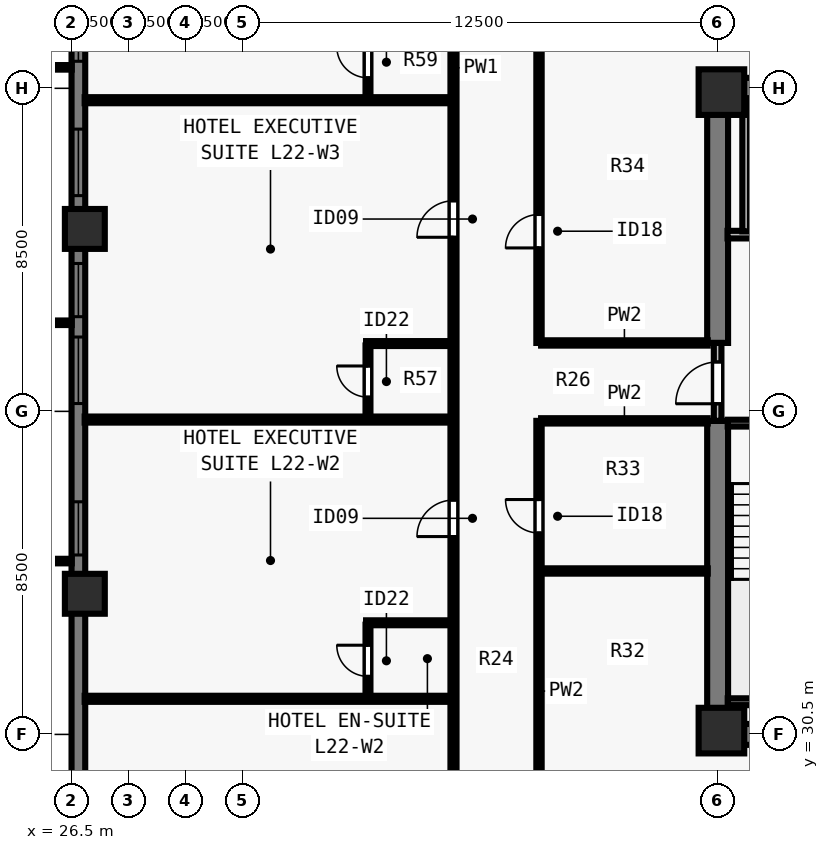
"""IFC4 building model, lengths in metres.
Left out: names, types, materials, properties, quantities, classifications, styles, units other than length and angle.
Written with IfcOpenShell. Run it as: python <this file> out.ifc"""

import sys

from ifc_helpers import new_model, si_unit, direction, frame, frame_2d, origin, origin_2d, place, context, subcontext, project, spatial, rectangle, extrude, element, fill, save


model = new_model("IFC4")
c1 = context("Model", 3, precision=1e-05, world=origin(), true_north=direction((0.0, 1.0)))
c2 = subcontext(c1, "Body", "Model", "MODEL_VIEW")
j1 = project(units=[si_unit("LENGTHUNIT", "METRE"), si_unit("PLANEANGLEUNIT", "RADIAN")], contexts=[c1])
p1 = place(None, origin())
s1 = spatial("IfcSite", under=j1, at=p1, CompositionType="ELEMENT")
p2 = place(p1, origin())
s2 = spatial("IfcBuilding", under=s1, at=p2, CompositionType="ELEMENT")
p3 = place(p2, frame((0.0, 0.0, 83.0)))
s3 = spatial("IfcBuildingStorey", under=s2, at=p3, CompositionType="ELEMENT", Elevation=83.0)
for number, where, z_axis, x_axis in (
    (1, (43.6, 30.6, 0.0), (0.0, 0.0, 1.0), (1.0, 0.0, 0.0)),
    (2, (43.6, 47.4, 0.0), (0.0, 0.0, 1.0), (1.0, 0.0, 0.0)),
):
    element("IfcColumn", number, at=place(p3, frame(where, z_axis=z_axis, x_axis=x_axis)), inside=s3, PredefinedType="COLUMN", context=c2, shape_type="SweptSolid", body=[
        extrude(rectangle(XDim=1.2, YDim=1.2, at=origin_2d()), origin(), (0.0, 0.0, 1.0), 3.5),
    ])
for number, where, z_axis, x_axis in (
    (3, (26.85, 43.8, 0.0), (0.0, 0.0, 1.0), (0.0, 1.0, 0.0)),
    (4, (26.85, 34.2, 0.0), (0.0, 0.0, 1.0), (0.0, 1.0, 0.0)),
):
    element("IfcColumn", number, at=place(p3, frame(where, z_axis=z_axis, x_axis=x_axis)), inside=s3, PredefinedType="COLUMN", context=c2, shape_type="SweptSolid", body=[
        extrude(rectangle(XDim=1.05, YDim=1.05, at=origin_2d()), origin(), (0.0, 0.0, 1.0), 3.5),
    ])
p4 = place(p3, frame((26.68, 16.5, 0.0), z_axis=(0.0, 0.0, 1.0), x_axis=(0.0, 1.0, 0.0)))
e5 = element("IfcWall", 5, at=p4, inside=s3, PredefinedType="SOLIDWALL", context=c2, shape_type="SweptSolid", body=[
    extrude(rectangle(XDim=44.662, YDim=0.36, at=frame_2d((22.331, 0.0))), origin(), (0.0, 0.0, 1.0), 3.28),
])
p5 = place(p4, frame((4.83, 0.0, 0.8)))
e6 = element("IfcOpeningElement", 6, at=p5, cuts=e5, PredefinedType="OPENING", context=c2, shape_type="SweptSolid", body=[
    extrude(rectangle(XDim=1.4, YDim=1.544, at=frame_2d((0.7, 0.772))), frame((0.0, 0.19, 0.0), z_axis=(0.0, -1.0, 0.0), x_axis=(1.0, 0.0, 0.0)), (0.0, 0.0, 1.0), 0.38),
])
p6 = place(p4, frame((8.015, 0.0, 0.8)))
e7 = element("IfcOpeningElement", 7, at=p6, cuts=e5, PredefinedType="OPENING", context=c2, shape_type="SweptSolid", body=[
    extrude(rectangle(XDim=1.75, YDim=1.544, at=frame_2d((0.875, 0.772))), frame((0.0, 0.19, 0.0), z_axis=(0.0, -1.0, 0.0), x_axis=(1.0, 0.0, 0.0)), (0.0, 0.0, 1.0), 0.38),
])
p7 = place(p4, frame((11.551, 0.0, 0.8)))
e8 = element("IfcOpeningElement", 8, at=p7, cuts=e5, PredefinedType="OPENING", context=c2, shape_type="SweptSolid", body=[
    extrude(rectangle(XDim=1.4, YDim=1.544, at=frame_2d((0.7, 0.772))), frame((0.0, 0.19, 0.0), z_axis=(0.0, -1.0, 0.0), x_axis=(1.0, 0.0, 0.0)), (0.0, 0.0, 1.0), 0.38),
])
p8 = place(p4, frame((18.721, 0.0, 0.8)))
e9 = element("IfcOpeningElement", 9, at=p8, cuts=e5, PredefinedType="OPENING", context=c2, shape_type="SweptSolid", body=[
    extrude(rectangle(XDim=1.4, YDim=1.544, at=frame_2d((0.7, 0.772))), frame((0.0, 0.19, 0.0), z_axis=(0.0, -1.0, 0.0), x_axis=(1.0, 0.0, 0.0)), (0.0, 0.0, 1.0), 0.38),
])
p9 = place(p4, frame((22.706, 0.0, 0.8)))
e10 = element("IfcOpeningElement", 10, at=p9, cuts=e5, PredefinedType="OPENING", context=c2, shape_type="SweptSolid", body=[
    extrude(rectangle(XDim=1.75, YDim=1.544, at=frame_2d((0.875, 0.772))), frame((0.0, 0.19, 0.0), z_axis=(0.0, -1.0, 0.0), x_axis=(1.0, 0.0, 0.0)), (0.0, 0.0, 1.0), 0.38),
])
p10 = place(p4, frame((24.991, 0.0, 0.8)))
e11 = element("IfcOpeningElement", 11, at=p10, cuts=e5, PredefinedType="OPENING", context=c2, shape_type="SweptSolid", body=[
    extrude(rectangle(XDim=1.4, YDim=1.544, at=frame_2d((0.7, 0.772))), frame((0.0, 0.19, 0.0), z_axis=(0.0, -1.0, 0.0), x_axis=(1.0, 0.0, 0.0)), (0.0, 0.0, 1.0), 0.38),
])
p11 = place(p4, frame((28.177, 0.0, 0.8)))
e12 = element("IfcOpeningElement", 12, at=p11, cuts=e5, PredefinedType="OPENING", context=c2, shape_type="SweptSolid", body=[
    extrude(rectangle(XDim=1.75, YDim=1.544, at=frame_2d((0.875, 0.772))), frame((0.0, 0.19, 0.0), z_axis=(0.0, -1.0, 0.0), x_axis=(1.0, 0.0, 0.0)), (0.0, 0.0, 1.0), 0.38),
])
p12 = place(p4, frame((31.711, 0.0, 0.8)))
e13 = element("IfcOpeningElement", 13, at=p12, cuts=e5, PredefinedType="OPENING", context=c2, shape_type="SweptSolid", body=[
    extrude(rectangle(XDim=1.4, YDim=1.544, at=frame_2d((0.7, 0.772))), frame((0.0, 0.19, 0.0), z_axis=(0.0, -1.0, 0.0), x_axis=(1.0, 0.0, 0.0)), (0.0, 0.0, 1.0), 0.38),
])
p13 = place(p4, frame((34.897, 0.0, 0.8)))
e14 = element("IfcOpeningElement", 14, at=p13, cuts=e5, PredefinedType="OPENING", context=c2, shape_type="SweptSolid", body=[
    extrude(rectangle(XDim=1.75, YDim=1.544, at=frame_2d((0.875, 0.772))), frame((0.0, 0.19, 0.0), z_axis=(0.0, -1.0, 0.0), x_axis=(1.0, 0.0, 0.0)), (0.0, 0.0, 1.0), 0.38),
])
for number, where, z_axis, x_axis in (
    (15, (43.225, 30.5, 0.0), (0.0, 0.0, 1.0), (1.0, 0.0, 0.0)),
    (16, (43.225, 47.5, 0.0), (0.0, 0.0, 1.0), (1.0, 0.0, 0.0)),
):
    element("IfcWall", number, at=place(p3, frame(where, z_axis=z_axis, x_axis=x_axis)), inside=s3, PredefinedType="SHEAR", context=c2, shape_type="SweptSolid", body=[
        extrude(rectangle(XDim=17.55, YDim=0.55, at=frame_2d((8.775, 0.0))), origin(), (0.0, 0.0, 1.0), 3.28),
    ])
p14 = place(p3, frame((43.5, 30.765, 0.0), z_axis=(0.0, 0.0, 1.0), x_axis=(0.0, 1.0, 0.0)))
e17 = element("IfcWall", 17, at=p14, inside=s3, PredefinedType="SHEAR", context=c2, shape_type="SweptSolid", body=[
    extrude(rectangle(XDim=7.985, YDim=0.55, at=frame_2d((3.993, 0.0))), origin(), (0.0, 0.0, 1.0), 3.28),
])
p15 = place(p3, frame((43.5, 40.8, 0.0), z_axis=(0.0, 0.0, 1.0), x_axis=(0.0, 1.0, 0.0)))
e18 = element("IfcWall", 18, at=p15, inside=s3, PredefinedType="SHEAR", context=c2, shape_type="SweptSolid", body=[
    extrude(rectangle(XDim=6.435, YDim=0.55, at=frame_2d((3.218, 0.0))), origin(), (0.0, 0.0, 1.0), 3.28),
])
p16 = place(p3, frame((43.5, 38.75, 0.0), z_axis=(0.0, 0.0, 1.0), x_axis=(0.0, 1.0, 0.0)))
e19 = element("IfcWall", 19, at=p16, inside=s3, PredefinedType="SOLIDWALL", context=c2, shape_type="SweptSolid", body=[
    extrude(rectangle(XDim=2.05, YDim=0.2, at=frame_2d((1.025, 0.0))), origin(), (0.0, 0.0, 1.0), 3.28),
])
p17 = place(p16, frame((0.45, 0.0, 0.0)))
e20 = element("IfcOpeningElement", 20, at=p17, cuts=e19, PredefinedType="OPENING", context=c2, shape_type="SweptSolid", body=[
    extrude(rectangle(XDim=1.1, YDim=2.15, at=frame_2d((0.55, 1.075))), frame((0.0, 0.11, 0.0), z_axis=(0.0, -1.0, 0.0), x_axis=(1.0, 0.0, 0.0)), (0.0, 0.0, 1.0), 0.22),
])
p18 = place(p3, frame((43.76, 43.65, 0.0), z_axis=(0.0, 0.0, 1.0), x_axis=(1.0, 0.0, 0.0)))
e21 = element("IfcWall", 21, at=p18, inside=s3, PredefinedType="SOLIDWALL", context=c2, shape_type="SweptSolid", body=[
    extrude(rectangle(XDim=3.505, YDim=0.2, at=frame_2d((1.752, 0.0))), origin(), (0.0, 0.0, 1.0), 3.28),
])
p19 = place(p18, frame((1.11, 0.0, 0.0)))
e22 = element("IfcOpeningElement", 22, at=p19, cuts=e21, PredefinedType="OPENING", context=c2, shape_type="SweptSolid", body=[
    extrude(rectangle(XDim=1.1, YDim=2.2, at=frame_2d((0.55, 1.1))), frame((0.0, 0.11, 0.0), z_axis=(0.0, -1.0, 0.0), x_axis=(1.0, 0.0, 0.0)), (0.0, 0.0, 1.0), 0.22),
])
p20 = place(p3, frame((44.25, 43.735, 0.0), z_axis=(0.0, 0.0, 1.0), x_axis=(0.0, 1.0, 0.0)))
e23 = element("IfcWall", 23, at=p20, inside=s3, PredefinedType="SOLIDWALL", context=c2, shape_type="SweptSolid", body=[
    extrude(rectangle(XDim=3.505, YDim=0.2, at=frame_2d((1.752, 0.0))), origin(), (0.0, 0.0, 1.0), 3.28),
])
p21 = place(p3, frame((36.55, 23.315, 0.0), z_axis=(0.0, 0.0, 1.0), x_axis=(0.0, 1.0, 0.0)))
e24 = element("IfcWall", 24, at=p21, inside=s3, PredefinedType="PARTITIONING", context=c2, shape_type="SweptSolid", body=[
    extrude(rectangle(XDim=31.37, YDim=0.16, at=frame_2d((15.685, 0.0))), origin(), (0.0, 0.0, 1.0), 3.28),
])
p22 = place(p21, frame((4.848, 0.0, 0.0)))
e25 = element("IfcOpeningElement", 25, at=p22, cuts=e24, PredefinedType="OPENING", context=c2, shape_type="SweptSolid", body=[
    extrude(rectangle(XDim=0.96, YDim=2.15, at=frame_2d((0.48, 1.075))), frame((0.0, 0.09, 0.0), z_axis=(0.0, -1.0, 0.0), x_axis=(1.0, 0.0, 0.0)), (0.0, 0.0, 1.0), 0.18),
])
p23 = place(p21, frame((12.39, 0.0, 0.0)))
e26 = element("IfcOpeningElement", 26, at=p23, cuts=e24, PredefinedType="OPENING", context=c2, shape_type="SweptSolid", body=[
    extrude(rectangle(XDim=0.96, YDim=2.15, at=frame_2d((0.48, 1.075))), frame((0.0, 0.09, 0.0), z_axis=(0.0, -1.0, 0.0), x_axis=(1.0, 0.0, 0.0)), (0.0, 0.0, 1.0), 0.18),
])
p24 = place(p21, frame((20.265, 0.0, 0.0)))
e27 = element("IfcOpeningElement", 27, at=p24, cuts=e24, PredefinedType="OPENING", context=c2, shape_type="SweptSolid", body=[
    extrude(rectangle(XDim=0.96, YDim=2.15, at=frame_2d((0.48, 1.075))), frame((0.0, 0.09, 0.0), z_axis=(0.0, -1.0, 0.0), x_axis=(1.0, 0.0, 0.0)), (0.0, 0.0, 1.0), 0.18),
])
p25 = place(p21, frame((28.223, 0.0, 0.0)))
e28 = element("IfcOpeningElement", 28, at=p25, cuts=e24, PredefinedType="OPENING", context=c2, shape_type="SweptSolid", body=[
    extrude(rectangle(XDim=0.96, YDim=2.15, at=frame_2d((0.48, 1.075))), frame((0.0, 0.09, 0.0), z_axis=(0.0, -1.0, 0.0), x_axis=(1.0, 0.0, 0.0)), (0.0, 0.0, 1.0), 0.18),
])
p26 = place(p3, frame((38.8, 25.555, 0.0), z_axis=(0.0, 0.0, 1.0), x_axis=(0.0, 1.0, 0.0)))
e29 = element("IfcWall", 29, at=p26, inside=s3, PredefinedType="PARTITIONING", context=c2, shape_type="SweptSolid", body=[
    extrude(rectangle(XDim=13.195, YDim=0.14, at=frame_2d((6.598, 0.0))), origin(), (0.0, 0.0, 1.0), 3.28),
])
p27 = place(p26, frame((1.045, 0.0, 0.0)))
e30 = element("IfcOpeningElement", 30, at=p27, cuts=e29, PredefinedType="OPENING", context=c2, shape_type="SweptSolid", body=[
    extrude(rectangle(XDim=0.88, YDim=2.1, at=frame_2d((0.44, 1.05))), frame((0.0, 0.08, 0.0), z_axis=(0.0, -1.0, 0.0), x_axis=(1.0, 0.0, 0.0)), (0.0, 0.0, 1.0), 0.16),
])
p28 = place(p26, frame((10.245, 0.0, 0.0)))
e31 = element("IfcOpeningElement", 31, at=p28, cuts=e29, PredefinedType="OPENING", context=c2, shape_type="SweptSolid", body=[
    extrude(rectangle(XDim=0.88, YDim=2.1, at=frame_2d((0.44, 1.05))), frame((0.0, 0.08, 0.0), z_axis=(0.0, -1.0, 0.0), x_axis=(1.0, 0.0, 0.0)), (0.0, 0.0, 1.0), 0.16),
])
p29 = place(p3, frame((38.8, 40.8, 0.0), z_axis=(0.0, 0.0, 1.0), x_axis=(0.0, 1.0, 0.0)))
e32 = element("IfcWall", 32, at=p29, inside=s3, PredefinedType="PARTITIONING", context=c2, shape_type="SweptSolid", body=[
    extrude(rectangle(XDim=11.645, YDim=0.14, at=frame_2d((5.823, 0.0))), origin(), (0.0, 0.0, 1.0), 3.28),
])
p30 = place(p29, frame((2.5, 0.0, 0.0)))
e33 = element("IfcOpeningElement", 33, at=p30, cuts=e32, PredefinedType="OPENING", context=c2, shape_type="SweptSolid", body=[
    extrude(rectangle(XDim=0.88, YDim=2.1, at=frame_2d((0.44, 1.05))), frame((0.0, 0.08, 0.0), z_axis=(0.0, -1.0, 0.0), x_axis=(1.0, 0.0, 0.0)), (0.0, 0.0, 1.0), 0.16),
])
for number, where, z_axis, x_axis in (
    (34, (38.855, 38.75, 0.0), (0.0, 0.0, 1.0), (1.0, 0.0, 0.0)),
    (35, (38.855, 40.8, 0.0), (0.0, 0.0, 1.0), (1.0, 0.0, 0.0)),
    (36, (38.855, 34.8, 0.0), (0.0, 0.0, 1.0), (1.0, 0.0, 0.0)),
):
    element("IfcWall", number, at=place(p3, frame(where, z_axis=z_axis, x_axis=x_axis)), inside=s3, PredefinedType="PARTITIONING", context=c2, shape_type="SweptSolid", body=[
        extrude(rectangle(XDim=4.385, YDim=0.14, at=frame_2d((2.192, 0.0))), origin(), (0.0, 0.0, 1.0), 3.28),
    ])
p31 = place(p3, frame((26.845, 31.437, 0.0), z_axis=(0.0, 0.0, 1.0), x_axis=(1.0, 0.0, 0.0)))
e37 = element("IfcWall", 37, at=p31, inside=s3, PredefinedType="PARTITIONING", context=c2, shape_type="SweptSolid", body=[
    extrude(rectangle(XDim=9.64, YDim=0.16, at=frame_2d((4.82, 0.0))), origin(), (0.0, 0.0, 1.0), 3.28),
])
p32 = place(p3, frame((34.25, 33.437, 0.0), z_axis=(0.0, 0.0, 1.0), x_axis=(1.0, 0.0, 0.0)))
e38 = element("IfcWall", 38, at=p32, inside=s3, PredefinedType="PLUMBINGWALL", context=c2, shape_type="SweptSolid", body=[
    extrude(rectangle(XDim=2.235, YDim=0.13, at=frame_2d((1.118, 0.0))), origin(), (0.0, 0.0, 1.0), 3.28),
])
p33 = place(p3, frame((34.3, 31.502, 0.0), z_axis=(0.0, 0.0, 1.0), x_axis=(0.0, 1.0, 0.0)))
e39 = element("IfcWall", 39, at=p33, inside=s3, PredefinedType="PLUMBINGWALL", context=c2, shape_type="SweptSolid", body=[
    extrude(rectangle(XDim=1.885, YDim=0.13, at=frame_2d((0.942, 0.0))), origin(), (0.0, 0.0, 1.0), 3.28),
])
p34 = place(p33, frame((0.525, 0.0, 0.0)))
e40 = element("IfcOpeningElement", 40, at=p34, cuts=e39, PredefinedType="OPENING", context=c2, shape_type="SweptSolid", body=[
    extrude(rectangle(XDim=0.82, YDim=2.1, at=frame_2d((0.41, 1.05))), frame((0.0, 0.075, 0.0), z_axis=(0.0, -1.0, 0.0), x_axis=(1.0, 0.0, 0.0)), (0.0, 0.0, 1.0), 0.15),
])
p35 = place(p3, frame((26.845, 38.784, 0.0), z_axis=(0.0, 0.0, 1.0), x_axis=(1.0, 0.0, 0.0)))
e41 = element("IfcWall", 41, at=p35, inside=s3, PredefinedType="PARTITIONING", context=c2, shape_type="SweptSolid", body=[
    extrude(rectangle(XDim=9.64, YDim=0.16, at=frame_2d((4.82, 0.0))), origin(), (0.0, 0.0, 1.0), 2.849),
])
p36 = place(p3, frame((34.25, 40.784, 0.0), z_axis=(0.0, 0.0, 1.0), x_axis=(1.0, 0.0, 0.0)))
e42 = element("IfcWall", 42, at=p36, inside=s3, PredefinedType="PLUMBINGWALL", context=c2, shape_type="SweptSolid", body=[
    extrude(rectangle(XDim=2.235, YDim=0.13, at=frame_2d((1.118, 0.0))), origin(), (0.0, 0.0, 1.0), 2.849),
])
p37 = place(p3, frame((34.3, 38.849, 0.0), z_axis=(0.0, 0.0, 1.0), x_axis=(0.0, 1.0, 0.0)))
e43 = element("IfcWall", 43, at=p37, inside=s3, PredefinedType="PLUMBINGWALL", context=c2, shape_type="SweptSolid", body=[
    extrude(rectangle(XDim=1.885, YDim=0.13, at=frame_2d((0.942, 0.0))), origin(), (0.0, 0.0, 1.0), 3.28),
])
p38 = place(p37, frame((0.525, 0.0, 0.0)))
e44 = element("IfcOpeningElement", 44, at=p38, cuts=e43, PredefinedType="OPENING", context=c2, shape_type="SweptSolid", body=[
    extrude(rectangle(XDim=0.82, YDim=2.1, at=frame_2d((0.41, 1.05))), frame((0.0, 0.075, 0.0), z_axis=(0.0, -1.0, 0.0), x_axis=(1.0, 0.0, 0.0)), (0.0, 0.0, 1.0), 0.15),
])
p39 = place(p3, frame((26.845, 47.187, 0.0), z_axis=(0.0, 0.0, 1.0), x_axis=(1.0, 0.0, 0.0)))
e45 = element("IfcWall", 45, at=p39, inside=s3, PredefinedType="PARTITIONING", context=c2, shape_type="SweptSolid", body=[
    extrude(rectangle(XDim=9.64, YDim=0.16, at=frame_2d((4.82, 0.0))), origin(), (0.0, 0.0, 1.0), 3.28),
])
p40 = place(p3, frame((34.3, 47.252, 0.0), z_axis=(0.0, 0.0, 1.0), x_axis=(0.0, 1.0, 0.0)))
e46 = element("IfcWall", 46, at=p40, inside=s3, PredefinedType="PLUMBINGWALL", context=c2, shape_type="SweptSolid", body=[
    extrude(rectangle(XDim=1.885, YDim=0.13, at=frame_2d((0.942, 0.0))), origin(), (0.0, 0.0, 1.0), 3.28),
])
p41 = place(p40, frame((0.525, 0.0, 0.0)))
e47 = element("IfcOpeningElement", 47, at=p41, cuts=e46, PredefinedType="OPENING", context=c2, shape_type="SweptSolid", body=[
    extrude(rectangle(XDim=0.82, YDim=2.1, at=frame_2d((0.41, 1.05))), frame((0.0, 0.075, 0.0), z_axis=(0.0, -1.0, 0.0), x_axis=(1.0, 0.0, 0.0)), (0.0, 0.0, 1.0), 0.15),
])
p42 = place(p3, frame((43.765, 38.69, 0.0), z_axis=(0.0, 0.0, 1.0), x_axis=(1.0, 0.0, 0.0)))
e48 = element("IfcWall", 48, at=p42, inside=s3, PredefinedType="SOLIDWALL", context=c2, shape_type="SweptSolid", body=[
    extrude(rectangle(XDim=3.23, YDim=0.18, at=frame_2d((1.615, 0.0))), origin(), (0.0, 0.0, 1.0), 3.28),
])
p43 = place(p42, frame((1.14, 0.0, 0.0)))
e49 = element("IfcOpeningElement", 49, at=p43, cuts=e48, PredefinedType="OPENING", context=c2, shape_type="SweptSolid", body=[
    extrude(rectangle(XDim=0.95, YDim=2.15, at=frame_2d((0.475, 1.075))), frame((0.0, 0.1, 0.0), z_axis=(0.0, -1.0, 0.0), x_axis=(1.0, 0.0, 0.0)), (0.0, 0.0, 1.0), 0.2),
])
p44 = place(p3, frame((43.765, 31.36, 0.0), z_axis=(0.0, 0.0, 1.0), x_axis=(1.0, 0.0, 0.0)))
e50 = element("IfcWall", 50, at=p44, inside=s3, PredefinedType="SOLIDWALL", context=c2, shape_type="SweptSolid", body=[
    extrude(rectangle(XDim=3.23, YDim=0.18, at=frame_2d((1.615, 0.0))), origin(), (0.0, 0.0, 1.0), 3.28),
])
p45 = place(p8, origin())
e51 = element("IfcWindow", 51, at=p45, inside=s3, PartitioningType="SINGLE_PANEL", PredefinedType="WINDOW", context=c2, shape_type="SweptSolid", body=[
    extrude(rectangle(XDim=1.4, YDim=1.544, at=frame_2d((0.7, 0.772))), frame((0.0, -0.05, 0.0), z_axis=(0.0, -1.0, 0.0), x_axis=(1.0, 0.0, 0.0)), (0.0, 0.0, 1.0), 0.06),
])
fill(e9, e51)
p46 = place(p9, origin())
e52 = element("IfcWindow", 52, at=p46, inside=s3, PartitioningType="SINGLE_PANEL", PredefinedType="WINDOW", context=c2, shape_type="SweptSolid", body=[
    extrude(rectangle(XDim=1.75, YDim=1.544, at=frame_2d((0.875, 0.772))), frame((0.0, -0.05, 0.0), z_axis=(0.0, -1.0, 0.0), x_axis=(1.0, 0.0, 0.0)), (0.0, 0.0, 1.0), 0.06),
])
fill(e10, e52)
p47 = place(p10, origin())
e53 = element("IfcWindow", 53, at=p47, inside=s3, PartitioningType="SINGLE_PANEL", PredefinedType="WINDOW", context=c2, shape_type="SweptSolid", body=[
    extrude(rectangle(XDim=1.4, YDim=1.544, at=frame_2d((0.7, 0.772))), frame((0.0, -0.05, 0.0), z_axis=(0.0, -1.0, 0.0), x_axis=(1.0, 0.0, 0.0)), (0.0, 0.0, 1.0), 0.06),
])
fill(e11, e53)
p48 = place(p11, origin())
e54 = element("IfcWindow", 54, at=p48, inside=s3, PartitioningType="SINGLE_PANEL", PredefinedType="WINDOW", context=c2, shape_type="SweptSolid", body=[
    extrude(rectangle(XDim=1.75, YDim=1.544, at=frame_2d((0.875, 0.772))), frame((0.0, -0.05, 0.0), z_axis=(0.0, -1.0, 0.0), x_axis=(1.0, 0.0, 0.0)), (0.0, 0.0, 1.0), 0.06),
])
fill(e12, e54)
p49 = place(p12, origin())
e55 = element("IfcWindow", 55, at=p49, inside=s3, PartitioningType="SINGLE_PANEL", PredefinedType="WINDOW", context=c2, shape_type="SweptSolid", body=[
    extrude(rectangle(XDim=1.4, YDim=1.544, at=frame_2d((0.7, 0.772))), frame((0.0, -0.05, 0.0), z_axis=(0.0, -1.0, 0.0), x_axis=(1.0, 0.0, 0.0)), (0.0, 0.0, 1.0), 0.06),
])
fill(e13, e55)
p50 = place(p17, origin())
e56 = element("IfcDoor", 56, at=p50, inside=s3, OperationType="SINGLE_SWING_LEFT", PredefinedType="DOOR", context=c2, shape_type="SweptSolid", body=[
    extrude(rectangle(XDim=1.1, YDim=2.15, at=frame_2d((0.55, 1.075))), frame((0.0, 0.025, 0.0), z_axis=(0.0, -1.0, 0.0), x_axis=(1.0, 0.0, 0.0)), (0.0, 0.0, 1.0), 0.05),
])
fill(e20, e56)
p51 = place(p28, origin())
e57 = element("IfcDoor", 57, at=p51, inside=s3, OperationType="SINGLE_SWING_RIGHT", PredefinedType="DOOR", context=c2, shape_type="SweptSolid", body=[
    extrude(rectangle(XDim=0.88, YDim=2.1, at=frame_2d((0.44, 1.05))), frame((0.0, 0.025, 0.0), z_axis=(0.0, -1.0, 0.0), x_axis=(1.0, 0.0, 0.0)), (0.0, 0.0, 1.0), 0.05),
])
fill(e31, e57)
p52 = place(p30, origin())
e58 = element("IfcDoor", 58, at=p52, inside=s3, OperationType="SINGLE_SWING_LEFT", PredefinedType="DOOR", context=c2, shape_type="SweptSolid", body=[
    extrude(rectangle(XDim=0.88, YDim=2.1, at=frame_2d((0.44, 1.05))), frame((0.0, 0.025, 0.0), z_axis=(0.0, -1.0, 0.0), x_axis=(1.0, 0.0, 0.0)), (0.0, 0.0, 1.0), 0.05),
])
fill(e33, e58)
p53 = place(p34, origin())
e59 = element("IfcDoor", 59, at=p53, inside=s3, OperationType="SINGLE_SWING_RIGHT", PredefinedType="DOOR", context=c2, shape_type="SweptSolid", body=[
    extrude(rectangle(XDim=0.82, YDim=2.1, at=frame_2d((0.41, 1.05))), frame((0.0, 0.025, 0.0), z_axis=(0.0, -1.0, 0.0), x_axis=(1.0, 0.0, 0.0)), (0.0, 0.0, 1.0), 0.05),
])
fill(e40, e59)
p54 = place(p23, origin())
e60 = element("IfcDoor", 60, at=p54, inside=s3, OperationType="SINGLE_SWING_LEFT", PredefinedType="DOOR", context=c2, shape_type="SweptSolid", body=[
    extrude(rectangle(XDim=0.96, YDim=2.15, at=frame_2d((0.48, 1.075))), frame((0.0, 0.025, 0.0), z_axis=(0.0, -1.0, 0.0), x_axis=(1.0, 0.0, 0.0)), (0.0, 0.0, 1.0), 0.05),
])
fill(e26, e60)
p55 = place(p38, origin())
e61 = element("IfcDoor", 61, at=p55, inside=s3, OperationType="SINGLE_SWING_RIGHT", PredefinedType="DOOR", context=c2, shape_type="SweptSolid", body=[
    extrude(rectangle(XDim=0.82, YDim=2.1, at=frame_2d((0.41, 1.05))), frame((0.0, 0.025, 0.0), z_axis=(0.0, -1.0, 0.0), x_axis=(1.0, 0.0, 0.0)), (0.0, 0.0, 1.0), 0.05),
])
fill(e44, e61)
p56 = place(p24, origin())
e62 = element("IfcDoor", 62, at=p56, inside=s3, OperationType="SINGLE_SWING_LEFT", PredefinedType="DOOR", context=c2, shape_type="SweptSolid", body=[
    extrude(rectangle(XDim=0.96, YDim=2.15, at=frame_2d((0.48, 1.075))), frame((0.0, 0.025, 0.0), z_axis=(0.0, -1.0, 0.0), x_axis=(1.0, 0.0, 0.0)), (0.0, 0.0, 1.0), 0.05),
])
fill(e27, e62)
p57 = place(p41, origin())
e63 = element("IfcDoor", 63, at=p57, inside=s3, OperationType="SINGLE_SWING_RIGHT", PredefinedType="DOOR", context=c2, shape_type="SweptSolid", body=[
    extrude(rectangle(XDim=0.82, YDim=2.1, at=frame_2d((0.41, 1.05))), frame((0.0, 0.025, 0.0), z_axis=(0.0, -1.0, 0.0), x_axis=(1.0, 0.0, 0.0)), (0.0, 0.0, 1.0), 0.05),
])
fill(e47, e63)
save(model, sys.argv[1])
